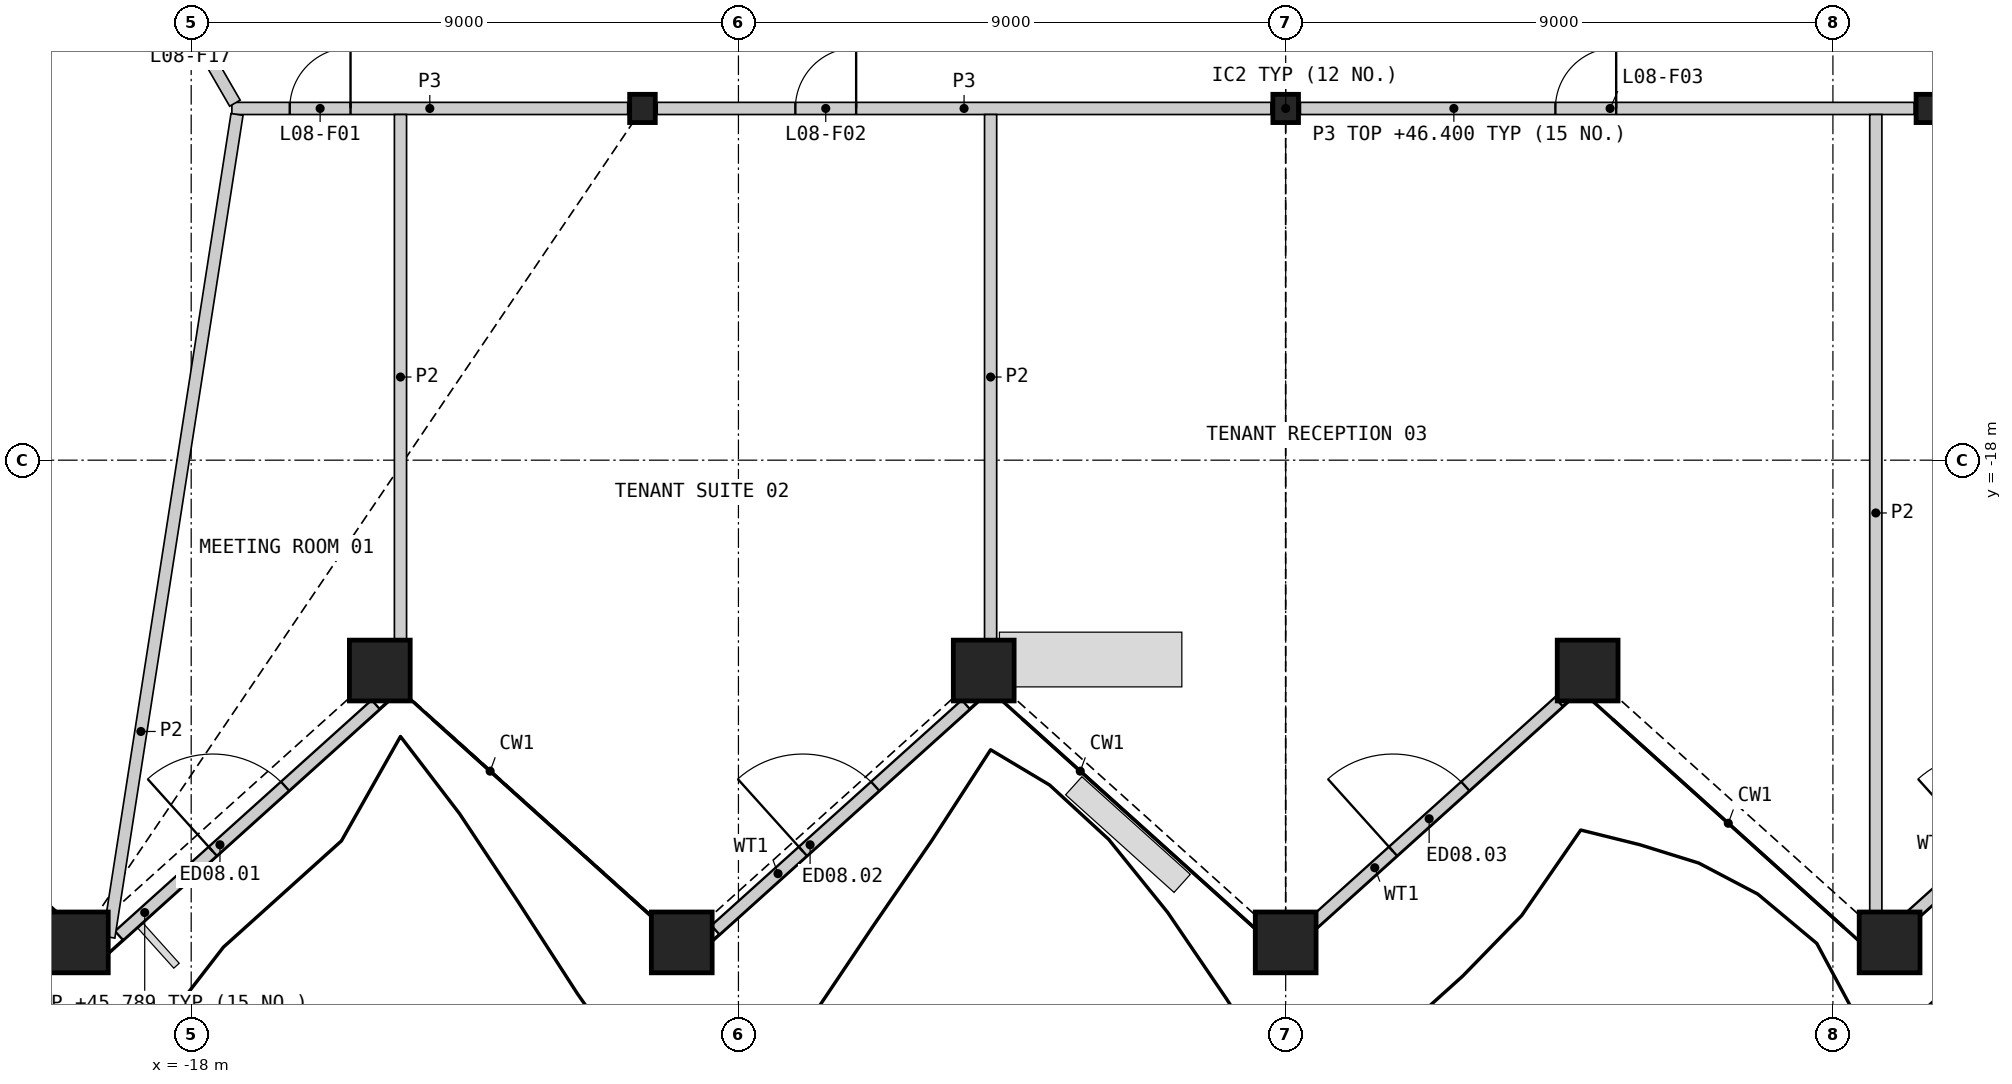
"""IFC4 building model, lengths in metres.
Left out: names, types, materials, properties, quantities, classifications, styles, units other than length and angle.
Written with IfcOpenShell. Run it as: python <this file> out.ifc"""

import sys

from ifc_helpers import new_model, si_unit, direction, frame, frame_2d, origin, origin_2d, place, context, subcontext, project, spatial, rectangle, hollow_rectangle, i_section, extrude, element, fill, save


model = new_model("IFC4")
c1 = context("Model", 3, precision=1e-05, world=origin(), true_north=direction((0.0, 1.0)))
c2 = subcontext(c1, "Body", "Model", "MODEL_VIEW")
j1 = project(units=[si_unit("LENGTHUNIT", "METRE"), si_unit("PLANEANGLEUNIT", "RADIAN")], contexts=[c1])
p1 = place(None, origin())
s1 = spatial("IfcSite", under=j1, at=p1, CompositionType="ELEMENT")
p2 = place(p1, origin())
s2 = spatial("IfcBuilding", under=s1, at=p2, CompositionType="ELEMENT")
p3 = place(p2, frame((0.0, 0.0, 42.6)))
s3 = spatial("IfcBuildingStorey", under=s2, at=p3, CompositionType="ELEMENT", Elevation=42.6)
for number, where, z_axis, x_axis in (
    (1, (-19.864, -25.931, 0.0), (0.0, 0.0, 1.0), (1.0, 0.0, 0.0)),
    (2, (-14.898, -21.46, 0.0), (0.0, 0.0, 1.0), (1.0, 0.0, 0.0)),
    (3, (-9.932, -25.931, 0.0), (0.0, 0.0, 1.0), (1.0, 0.0, 0.0)),
    (4, (-4.966, -21.46, 0.0), (0.0, 0.0, 1.0), (1.0, 0.0, 0.0)),
    (5, (0.0, -25.931, 0.0), (0.0, 0.0, 1.0), (1.0, 0.0, 0.0)),
    (6, (4.966, -21.46, 0.0), (0.0, 0.0, 1.0), (1.0, 0.0, 0.0)),
    (7, (9.932, -25.931, 0.0), (0.0, 0.0, 1.0), (1.0, 0.0, 0.0)),
):
    element("IfcColumn", number, at=place(p3, frame(where, z_axis=z_axis, x_axis=x_axis)), inside=s3, PredefinedType="COLUMN", context=c2, shape_type="SweptSolid", body=[
        extrude(hollow_rectangle(XDim=1.0, YDim=1.0, WallThickness=0.07, at=origin_2d()), origin(), (0.0, 0.0, 1.0), 4.2),
    ])
for number, where, z_axis, x_axis in (
    (8, (-10.578, -12.215, 0.0), (0.0, 0.0, 1.0), (1.0, 0.0, 0.0)),
    (9, (0.0, -12.215, 0.0), (0.0, 0.0, 1.0), (1.0, 0.0, 0.0)),
    (10, (10.578, -12.215, 0.0), (0.0, 0.0, 1.0), (1.0, 0.0, 0.0)),
):
    element("IfcColumn", number, at=place(p3, frame(where, z_axis=z_axis, x_axis=x_axis)), inside=s3, PredefinedType="COLUMN", context=c2, shape_type="SweptSolid", body=[
        extrude(i_section(OverallWidth=0.421, OverallDepth=0.465, WebThickness=0.045, FlangeThickness=0.072, at=origin_2d()), origin(), (0.0, 0.0, 1.0), 4.2),
    ])
p4 = place(p3, frame((-19.187, -25.82, 0.0), z_axis=(0.0, 0.0, 1.0), x_axis=(0.743142396166, 0.669133304373, 0.0)))
e11 = element("IfcWall", 11, at=p4, inside=s3, PredefinedType="SOLIDWALL", context=c2, shape_type="SweptSolid", body=[
    extrude(rectangle(XDim=5.68, YDim=0.2, at=frame_2d((2.84, 0.0))), origin(), (0.0, 0.0, 1.0), 3.189),
])
p5 = place(p4, frame((2.073, 0.0, 0.0)))
e12 = element("IfcOpeningElement", 12, at=p5, cuts=e11, PredefinedType="OPENING", context=c2, shape_type="SweptSolid", body=[
    extrude(rectangle(XDim=1.6, YDim=2.4, at=frame_2d((0.8, 1.2))), frame((0.0, 0.11, 0.0), z_axis=(0.0, -1.0, 0.0), x_axis=(1.0, 0.0, 0.0)), (0.0, 0.0, 1.0), 0.22),
])
p6 = place(p3, frame((-9.379, -25.728, 0.0), z_axis=(0.0, 0.0, 1.0), x_axis=(0.743160522465, 0.669113172677, 0.0)))
e13 = element("IfcWall", 13, at=p6, inside=s3, PredefinedType="SOLIDWALL", context=c2, shape_type="SweptSolid", body=[
    extrude(rectangle(XDim=5.542, YDim=0.2, at=frame_2d((2.771, 0.0))), origin(), (0.0, 0.0, 1.0), 3.189),
])
p7 = place(p6, frame((1.935, 0.0, 0.0)))
e14 = element("IfcOpeningElement", 14, at=p7, cuts=e13, PredefinedType="OPENING", context=c2, shape_type="SweptSolid", body=[
    extrude(rectangle(XDim=1.6, YDim=2.4, at=frame_2d((0.8, 1.2))), frame((0.0, 0.11, 0.0), z_axis=(0.0, -1.0, 0.0), x_axis=(1.0, 0.0, 0.0)), (0.0, 0.0, 1.0), 0.22),
])
p8 = place(p3, frame((0.456, -25.612, 0.0), z_axis=(0.0, 0.0, 1.0), x_axis=(0.743166762424, 0.669106242108, 0.0)))
e15 = element("IfcWall", 15, at=p8, inside=s3, PredefinedType="SOLIDWALL", context=c2, shape_type="SweptSolid", body=[
    extrude(rectangle(XDim=5.433, YDim=0.2, at=frame_2d((2.716, 0.0))), origin(), (0.0, 0.0, 1.0), 3.189),
])
p9 = place(p8, frame((1.762, 0.0, 0.0)))
e16 = element("IfcOpeningElement", 16, at=p9, cuts=e15, PredefinedType="OPENING", context=c2, shape_type="SweptSolid", body=[
    extrude(rectangle(XDim=1.6, YDim=2.4, at=frame_2d((0.8, 1.2))), frame((0.0, 0.11, 0.0), z_axis=(0.0, -1.0, 0.0), x_axis=(1.0, 0.0, 0.0)), (0.0, 0.0, 1.0), 0.22),
])
p10 = place(p3, frame((10.161, -25.612, 0.0), z_axis=(0.0, 0.0, 1.0), x_axis=(0.743159085791, 0.669114768337, 0.0)))
e17 = element("IfcWall", 17, at=p10, inside=s3, PredefinedType="SOLIDWALL", context=c2, shape_type="SweptSolid", body=[
    extrude(rectangle(XDim=5.124, YDim=0.2, at=frame_2d((2.562, 0.0))), origin(), (0.0, 0.0, 1.0), 3.189),
])
p11 = place(p10, frame((1.762, 0.0, 0.0)))
e18 = element("IfcOpeningElement", 18, at=p11, cuts=e17, PredefinedType="OPENING", context=c2, shape_type="SweptSolid", body=[
    extrude(rectangle(XDim=1.6, YDim=2.4, at=frame_2d((0.8, 1.2))), frame((0.0, 0.11, 0.0), z_axis=(0.0, -1.0, 0.0), x_axis=(1.0, 0.0, 0.0)), (0.0, 0.0, 1.0), 0.22),
])
p12 = place(p3, frame((0.242, -12.215, 0.0), z_axis=(0.0, 0.0, 1.0), x_axis=(1.0, 0.0, 0.0)))
e19 = element("IfcWall", 19, at=p12, inside=s3, PredefinedType="PARTITIONING", context=c2, shape_type="SweptSolid", body=[
    extrude(rectangle(XDim=10.094, YDim=0.2, at=frame_2d((5.047, 0.0))), origin(), (0.0, 0.0, 1.0), 3.8),
])
p13 = place(p12, frame((4.193, 0.0, 0.0)))
e20 = element("IfcOpeningElement", 20, at=p13, cuts=e19, PredefinedType="OPENING", context=c2, shape_type="SweptSolid", body=[
    extrude(rectangle(XDim=1.0, YDim=2.1, at=frame_2d((0.5, 1.05))), frame((0.0, 0.11, 0.0), z_axis=(0.0, -1.0, 0.0), x_axis=(1.0, 0.0, 0.0)), (0.0, 0.0, 1.0), 0.22),
])
p14 = place(p3, frame((-10.336, -12.215, 0.0), z_axis=(0.0, 0.0, 1.0), x_axis=(1.0, 0.0, 0.0)))
e21 = element("IfcWall", 21, at=p14, inside=s3, PredefinedType="PARTITIONING", context=c2, shape_type="SweptSolid", body=[
    extrude(rectangle(XDim=10.094, YDim=0.2, at=frame_2d((5.047, 0.0))), origin(), (0.0, 0.0, 1.0), 3.8),
])
p15 = place(p14, frame((2.272, 0.0, 0.0)))
e22 = element("IfcOpeningElement", 22, at=p15, cuts=e21, PredefinedType="OPENING", context=c2, shape_type="SweptSolid", body=[
    extrude(rectangle(XDim=1.0, YDim=2.1, at=frame_2d((0.5, 1.05))), frame((0.0, 0.11, 0.0), z_axis=(0.0, -1.0, 0.0), x_axis=(1.0, 0.0, 0.0)), (0.0, 0.0, 1.0), 0.22),
])
p16 = place(p3, frame((-17.331, -12.215, 0.0), z_axis=(0.0, 0.0, 1.0), x_axis=(1.0, 0.0, 0.0)))
e23 = element("IfcWall", 23, at=p16, inside=s3, PredefinedType="PARTITIONING", context=c2, shape_type="SweptSolid", body=[
    extrude(rectangle(XDim=6.51, YDim=0.2, at=frame_2d((3.255, 0.0))), origin(), (0.0, 0.0, 1.0), 3.8),
])
p17 = place(p16, frame((0.951, 0.0, 0.0)))
e24 = element("IfcOpeningElement", 24, at=p17, cuts=e23, PredefinedType="OPENING", context=c2, shape_type="SweptSolid", body=[
    extrude(rectangle(XDim=1.0, YDim=2.1, at=frame_2d((0.5, 1.05))), frame((0.0, 0.11, 0.0), z_axis=(0.0, -1.0, 0.0), x_axis=(1.0, 0.0, 0.0)), (0.0, 0.0, 1.0), 0.22),
])
p18 = place(p3, frame((-19.144, -8.902, 0.0), z_axis=(0.0, 0.0, 1.0), x_axis=(0.499958791762, -0.866049194065, 0.0)))
e25 = element("IfcWall", 25, at=p18, inside=s3, PredefinedType="PARTITIONING", context=c2, shape_type="SweptSolid", body=[
    extrude(rectangle(XDim=3.726, YDim=0.2, at=frame_2d((1.863, 0.0))), origin(), (0.0, 0.0, 1.0), 3.8),
])
p19 = place(p18, frame((1.363, 0.0, 0.0)))
e26 = element("IfcOpeningElement", 26, at=p19, cuts=e25, PredefinedType="OPENING", context=c2, shape_type="SweptSolid", body=[
    extrude(rectangle(XDim=1.0, YDim=2.1, at=frame_2d((0.5, 1.05))), frame((0.0, 0.11, 0.0), z_axis=(0.0, -1.0, 0.0), x_axis=(1.0, 0.0, 0.0)), (0.0, 0.0, 1.0), 0.22),
])
p20 = place(p3, frame((-19.354, -25.845, 0.0), z_axis=(0.0, 0.0, 1.0), x_axis=(0.153927101979, 0.98808220674, 0.0)))
e27 = element("IfcWall", 27, at=p20, inside=s3, PredefinedType="PARTITIONING", context=c2, shape_type="SweptSolid", body=[
    extrude(rectangle(XDim=13.694, YDim=0.2, at=frame_2d((6.847, 0.0))), origin(), (0.0, 0.0, 1.0), 2.885),
])
p21 = place(p3, frame((9.705, -25.421, 0.0), z_axis=(0.0, 0.0, 1.0), x_axis=(0.0, 1.0, 0.0)))
e28 = element("IfcWall", 28, at=p21, inside=s3, PredefinedType="PARTITIONING", context=c2, shape_type="SweptSolid", body=[
    extrude(rectangle(XDim=13.106, YDim=0.2, at=frame_2d((6.553, 0.0))), origin(), (0.0, 0.0, 1.0), 2.885),
])
for number, where, z_axis, x_axis in (
    (29, (-14.558, -20.95, 0.0), (0.0, 0.0, 1.0), (0.0, 1.0, 0.0)),
    (30, (-4.853, -20.95, 0.0), (0.0, 0.0, 1.0), (0.0, 1.0, 0.0)),
):
    element("IfcWall", number, at=place(p3, frame(where, z_axis=z_axis, x_axis=x_axis)), inside=s3, PredefinedType="PARTITIONING", context=c2, shape_type="SweptSolid", body=[
        extrude(rectangle(XDim=8.635, YDim=0.2, at=frame_2d((4.317, 0.0))), origin(), (0.0, 0.0, 1.0), 2.885),
    ])
p22 = place(p5, origin())
e31 = element("IfcDoor", 31, at=p22, inside=s3, OperationType="DOUBLE_DOOR_SINGLE_SWING", PredefinedType="DOOR", context=c2, shape_type="SweptSolid", body=[
    extrude(rectangle(XDim=1.6, YDim=2.4, at=frame_2d((0.8, 1.2))), frame((0.0, 0.025, 0.0), z_axis=(0.0, -1.0, 0.0), x_axis=(1.0, 0.0, 0.0)), (0.0, 0.0, 1.0), 0.05),
])
fill(e12, e31)
p23 = place(p7, origin())
e32 = element("IfcDoor", 32, at=p23, inside=s3, OperationType="DOUBLE_DOOR_SINGLE_SWING", PredefinedType="DOOR", context=c2, shape_type="SweptSolid", body=[
    extrude(rectangle(XDim=1.6, YDim=2.4, at=frame_2d((0.8, 1.2))), frame((0.0, 0.025, 0.0), z_axis=(0.0, -1.0, 0.0), x_axis=(1.0, 0.0, 0.0)), (0.0, 0.0, 1.0), 0.05),
])
fill(e14, e32)
p24 = place(p9, origin())
e33 = element("IfcDoor", 33, at=p24, inside=s3, OperationType="DOUBLE_DOOR_SINGLE_SWING", PredefinedType="DOOR", context=c2, shape_type="SweptSolid", body=[
    extrude(rectangle(XDim=1.6, YDim=2.4, at=frame_2d((0.8, 1.2))), frame((0.0, 0.025, 0.0), z_axis=(0.0, -1.0, 0.0), x_axis=(1.0, 0.0, 0.0)), (0.0, 0.0, 1.0), 0.05),
])
fill(e16, e33)
p25 = place(p17, origin())
e34 = element("IfcDoor", 34, at=p25, inside=s3, OperationType="SINGLE_SWING_RIGHT", PredefinedType="DOOR", context=c2, shape_type="SweptSolid", body=[
    extrude(rectangle(XDim=1.0, YDim=2.1, at=frame_2d((0.5, 1.05))), frame((0.0, 0.025, 0.0), z_axis=(0.0, -1.0, 0.0), x_axis=(1.0, 0.0, 0.0)), (0.0, 0.0, 1.0), 0.05),
])
fill(e24, e34)
p26 = place(p15, origin())
e35 = element("IfcDoor", 35, at=p26, inside=s3, OperationType="SINGLE_SWING_RIGHT", PredefinedType="DOOR", context=c2, shape_type="SweptSolid", body=[
    extrude(rectangle(XDim=1.0, YDim=2.1, at=frame_2d((0.5, 1.05))), frame((0.0, 0.025, 0.0), z_axis=(0.0, -1.0, 0.0), x_axis=(1.0, 0.0, 0.0)), (0.0, 0.0, 1.0), 0.05),
])
fill(e22, e35)
p27 = place(p13, origin())
e36 = element("IfcDoor", 36, at=p27, inside=s3, OperationType="SINGLE_SWING_RIGHT", PredefinedType="DOOR", context=c2, shape_type="SweptSolid", body=[
    extrude(rectangle(XDim=1.0, YDim=2.1, at=frame_2d((0.5, 1.05))), frame((0.0, 0.025, 0.0), z_axis=(0.0, -1.0, 0.0), x_axis=(1.0, 0.0, 0.0)), (0.0, 0.0, 1.0), 0.05),
])
fill(e20, e36)
save(model, sys.argv[1])
